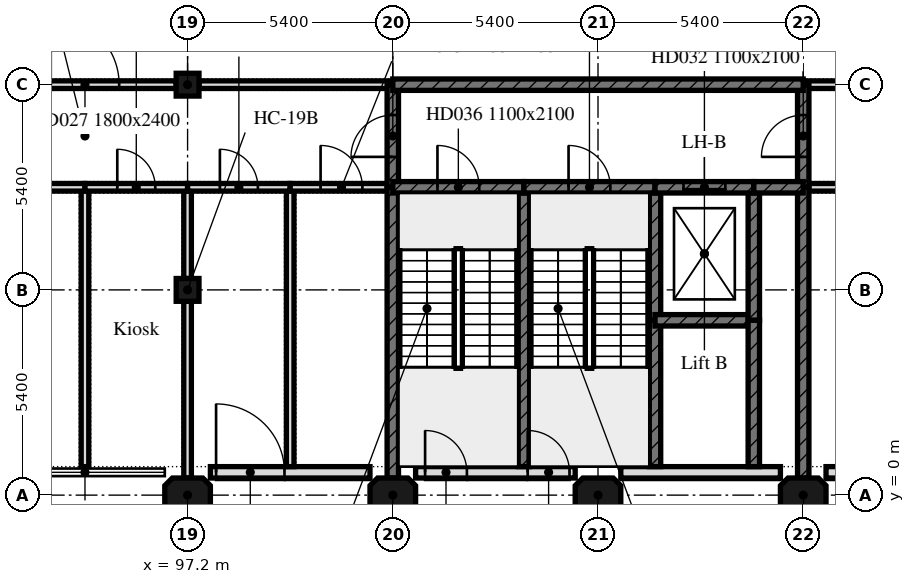
"""IFC4 building model, lengths in metres.
Left out: names, types, materials, properties, quantities, classifications, styles, units other than length and angle.
Written with IfcOpenShell. Run it as: python <this file> out.ifc"""

import sys

from ifc_helpers import new_model, si_unit, direction, frame, frame_2d, origin, origin_2d, place, context, subcontext, project, spatial, polyline, rectangle, outline, extrude, element, fill, save


model = new_model("IFC4")
c1 = context("Model", 3, precision=1e-05, world=origin(), true_north=direction((0.0, 1.0)))
c2 = subcontext(c1, "Body", "Model", "MODEL_VIEW")
j1 = project(units=[si_unit("LENGTHUNIT", "METRE"), si_unit("PLANEANGLEUNIT", "RADIAN")], contexts=[c1])
p1 = place(None, origin())
s1 = spatial("IfcSite", under=j1, at=p1, CompositionType="ELEMENT")
p2 = place(p1, origin())
s2 = spatial("IfcBuilding", under=s1, at=p2, CompositionType="ELEMENT")
p3 = place(p2, origin())
s3 = spatial("IfcBuildingStorey", under=s2, at=p3, CompositionType="ELEMENT", Elevation=0.0)
p4 = place(p3, frame((97.2, 0.0, -0.4), z_axis=(0.0, 0.0, 1.0), x_axis=(1.0, 0.0, 0.0)))
e1 = element("IfcColumn", 1, at=p4, inside=s3, PredefinedType="COLUMN", context=c2, shape_type="SweptSolid", body=[
    extrude(outline(polyline([(-0.4, -0.45), (0.4, -0.45), (0.6, -0.25), (0.6, 0.25), (0.4, 0.45), (-0.4, 0.45), (-0.6, 0.25), (-0.6, -0.25), (-0.4, -0.45)])), origin(), (0.0, 0.0, 1.0), 8.5),
])
for number, where, z_axis, x_axis in (
    (2, (97.2, 5.4, -0.4), (0.0, 0.0, 1.0), (1.0, 0.0, 0.0)),
    (3, (97.2, 10.8, -0.4), (0.0, 0.0, 1.0), (1.0, 0.0, 0.0)),
):
    element("IfcColumn", number, at=place(p3, frame(where, z_axis=z_axis, x_axis=x_axis)), inside=s3, PredefinedType="COLUMN", context=c2, shape_type="SweptSolid", body=[
        extrude(rectangle(XDim=0.6, YDim=0.6, at=origin_2d()), origin(), (0.0, 0.0, 1.0), 8.5),
    ])
for number, where, z_axis, x_axis in (
    (4, (102.6, 0.0, -0.4), (0.0, 0.0, 1.0), (1.0, 0.0, 0.0)),
    (5, (108.0, 0.0, -0.4), (0.0, 0.0, 1.0), (1.0, 0.0, 0.0)),
    (6, (113.4, 0.0, -0.4), (0.0, 0.0, 1.0), (1.0, 0.0, 0.0)),
):
    element("IfcColumn", number, at=place(p3, frame(where, z_axis=z_axis, x_axis=x_axis)), inside=s3, PredefinedType="COLUMN", context=c2, shape_type="SweptSolid", body=[
        extrude(outline(polyline([(-0.4, -0.45), (0.4, -0.45), (0.6, -0.25), (0.6, 0.25), (0.4, 0.45), (-0.4, 0.45), (-0.6, 0.25), (-0.6, -0.25), (-0.4, -0.45)])), origin(), (0.0, 0.0, 1.0), 8.5),
    ])
p5 = place(p3, frame((97.8, 0.6, 0.0), z_axis=(0.0, 0.0, 1.0), x_axis=(1.0, 0.0, 0.0)))
e7 = element("IfcWall", 7, at=p5, inside=s3, PredefinedType="SOLIDWALL", context=c2, shape_type="SweptSolid", body=[
    extrude(rectangle(XDim=4.2, YDim=0.3, at=frame_2d((2.1, 0.0))), origin(), (0.0, 0.0, 1.0), 8.1),
])
p6 = place(p5, frame((0.15, 0.0, 0.0)))
e8 = element("IfcOpeningElement", 8, at=p6, cuts=e7, PredefinedType="OPENING", context=c2, shape_type="SweptSolid", body=[
    extrude(rectangle(XDim=1.8, YDim=2.4, at=frame_2d((0.9, 1.2))), frame((0.0, 0.15, 0.0), z_axis=(0.0, -1.0, 0.0), x_axis=(1.0, 0.0, 0.0)), (0.0, 0.0, 1.0), 0.3),
])
p7 = place(p3, frame((103.2, 0.6, 0.0), z_axis=(0.0, 0.0, 1.0), x_axis=(1.0, 0.0, 0.0)))
e9 = element("IfcWall", 9, at=p7, inside=s3, PredefinedType="SOLIDWALL", context=c2, shape_type="SweptSolid", body=[
    extrude(rectangle(XDim=4.2, YDim=0.3, at=frame_2d((2.1, 0.0))), origin(), (0.0, 0.0, 1.0), 8.1),
])
p8 = place(p7, frame((0.25, 0.0, 0.0)))
e10 = element("IfcOpeningElement", 10, at=p8, cuts=e9, PredefinedType="OPENING", context=c2, shape_type="SweptSolid", body=[
    extrude(rectangle(XDim=1.1, YDim=2.1, at=frame_2d((0.55, 1.05))), frame((0.0, 0.15, 0.0), z_axis=(0.0, -1.0, 0.0), x_axis=(1.0, 0.0, 0.0)), (0.0, 0.0, 1.0), 0.3),
])
p9 = place(p7, frame((2.95, 0.0, 0.0)))
e11 = element("IfcOpeningElement", 11, at=p9, cuts=e9, PredefinedType="OPENING", context=c2, shape_type="SweptSolid", body=[
    extrude(rectangle(XDim=1.1, YDim=2.1, at=frame_2d((0.55, 1.05))), frame((0.0, 0.15, 0.0), z_axis=(0.0, -1.0, 0.0), x_axis=(1.0, 0.0, 0.0)), (0.0, 0.0, 1.0), 0.3),
])
p10 = place(p3, frame((108.6, 0.6, 0.0), z_axis=(0.0, 0.0, 1.0), x_axis=(1.0, 0.0, 0.0)))
e12 = element("IfcWall", 12, at=p10, inside=s3, PredefinedType="SOLIDWALL", context=c2, shape_type="SweptSolid", body=[
    extrude(rectangle(XDim=4.2, YDim=0.3, at=frame_2d((2.1, 0.0))), origin(), (0.0, 0.0, 1.0), 8.1),
])
p11 = place(p3, frame((114.0, 0.6, 0.0), z_axis=(0.0, 0.0, 1.0), x_axis=(1.0, 0.0, 0.0)))
e13 = element("IfcWall", 13, at=p11, inside=s3, PredefinedType="SOLIDWALL", context=c2, shape_type="SweptSolid", body=[
    extrude(rectangle(XDim=4.2, YDim=0.3, at=frame_2d((2.1, 0.0))), origin(), (0.0, 0.0, 1.0), 8.1),
])
p12 = place(p11, frame((2.55, 0.0, 0.9)))
e14 = element("IfcOpeningElement", 14, at=p12, cuts=e13, PredefinedType="OPENING", context=c2, shape_type="SweptSolid", body=[
    extrude(rectangle(XDim=1.1, YDim=1.7, at=frame_2d((0.55, 0.85))), frame((0.0, 0.15, 0.0), z_axis=(0.0, -1.0, 0.0), x_axis=(1.0, 0.0, 0.0)), (0.0, 0.0, 1.0), 0.3),
])
p13 = place(p3, frame((94.5, 0.75, 0.0), z_axis=(0.0, 0.0, 1.0), x_axis=(0.0, 1.0, 0.0)))
e15 = element("IfcWall", 15, at=p13, inside=s3, PredefinedType="PARTITIONING", context=c2, shape_type="SweptSolid", body=[
    extrude(rectangle(XDim=7.35, YDim=0.2, at=frame_2d((3.675, 0.0))), origin(), (0.0, 0.0, 1.0), 8.1),
])
p14 = place(p3, frame((86.4, 8.1, 0.0), z_axis=(0.0, 0.0, 1.0), x_axis=(1.0, 0.0, 0.0)))
e16 = element("IfcWall", 16, at=p14, inside=s3, PredefinedType="PARTITIONING", context=c2, shape_type="SweptSolid", body=[
    extrude(rectangle(XDim=8.1, YDim=0.2, at=frame_2d((4.05, 0.0))), origin(), (0.0, 0.0, 1.0), 8.1),
])
p15 = place(p14, frame((3.55, 0.0, 0.0)))
e17 = element("IfcOpeningElement", 17, at=p15, cuts=e16, PredefinedType="OPENING", context=c2, shape_type="SweptSolid", body=[
    extrude(rectangle(XDim=1.0, YDim=2.1, at=frame_2d((0.5, 1.05))), frame((0.0, 0.1, 0.0), z_axis=(0.0, -1.0, 0.0), x_axis=(1.0, 0.0, 0.0)), (0.0, 0.0, 1.0), 0.2),
])
p16 = place(p3, frame((97.2, 0.45, 0.0), z_axis=(0.0, 0.0, 1.0), x_axis=(0.0, 1.0, 0.0)))
e18 = element("IfcWall", 18, at=p16, inside=s3, PredefinedType="PARTITIONING", context=c2, shape_type="SweptSolid", body=[
    extrude(rectangle(XDim=4.65, YDim=0.2, at=frame_2d((2.325, 0.0))), origin(), (0.0, 0.0, 1.0), 8.1),
])
p17 = place(p3, frame((97.2, 5.7, 0.0), z_axis=(0.0, 0.0, 1.0), x_axis=(0.0, 1.0, 0.0)))
e19 = element("IfcWall", 19, at=p17, inside=s3, PredefinedType="PARTITIONING", context=c2, shape_type="SweptSolid", body=[
    extrude(rectangle(XDim=2.4, YDim=0.2, at=frame_2d((1.2, 0.0))), origin(), (0.0, 0.0, 1.0), 8.1),
])
p18 = place(p3, frame((94.5, 8.1, 0.0), z_axis=(0.0, 0.0, 1.0), x_axis=(1.0, 0.0, 0.0)))
e20 = element("IfcWall", 20, at=p18, inside=s3, PredefinedType="PARTITIONING", context=c2, shape_type="SweptSolid", body=[
    extrude(rectangle(XDim=2.7, YDim=0.2, at=frame_2d((1.35, 0.0))), origin(), (0.0, 0.0, 1.0), 8.1),
])
p19 = place(p18, frame((0.85, 0.0, 0.0)))
e21 = element("IfcOpeningElement", 21, at=p19, cuts=e20, PredefinedType="OPENING", context=c2, shape_type="SweptSolid", body=[
    extrude(rectangle(XDim=1.0, YDim=2.1, at=frame_2d((0.5, 1.05))), frame((0.0, 0.1, 0.0), z_axis=(0.0, -1.0, 0.0), x_axis=(1.0, 0.0, 0.0)), (0.0, 0.0, 1.0), 0.2),
])
p20 = place(p3, frame((99.9, 0.75, 0.0), z_axis=(0.0, 0.0, 1.0), x_axis=(0.0, 1.0, 0.0)))
e22 = element("IfcWall", 22, at=p20, inside=s3, PredefinedType="PARTITIONING", context=c2, shape_type="SweptSolid", body=[
    extrude(rectangle(XDim=7.35, YDim=0.2, at=frame_2d((3.675, 0.0))), origin(), (0.0, 0.0, 1.0), 8.1),
])
p21 = place(p3, frame((97.2, 8.1, 0.0), z_axis=(0.0, 0.0, 1.0), x_axis=(1.0, 0.0, 0.0)))
e23 = element("IfcWall", 23, at=p21, inside=s3, PredefinedType="PARTITIONING", context=c2, shape_type="SweptSolid", body=[
    extrude(rectangle(XDim=2.7, YDim=0.2, at=frame_2d((1.35, 0.0))), origin(), (0.0, 0.0, 1.0), 8.1),
])
p22 = place(p21, frame((0.85, 0.0, 0.0)))
e24 = element("IfcOpeningElement", 24, at=p22, cuts=e23, PredefinedType="OPENING", context=c2, shape_type="SweptSolid", body=[
    extrude(rectangle(XDim=1.0, YDim=2.1, at=frame_2d((0.5, 1.05))), frame((0.0, 0.1, 0.0), z_axis=(0.0, -1.0, 0.0), x_axis=(1.0, 0.0, 0.0)), (0.0, 0.0, 1.0), 0.2),
])
p23 = place(p3, frame((99.9, 8.1, 0.0), z_axis=(0.0, 0.0, 1.0), x_axis=(1.0, 0.0, 0.0)))
e25 = element("IfcWall", 25, at=p23, inside=s3, PredefinedType="PARTITIONING", context=c2, shape_type="SweptSolid", body=[
    extrude(rectangle(XDim=2.7, YDim=0.2, at=frame_2d((1.35, 0.0))), origin(), (0.0, 0.0, 1.0), 8.1),
])
p24 = place(p23, frame((0.8, 0.0, 0.0)))
e26 = element("IfcOpeningElement", 26, at=p24, cuts=e25, PredefinedType="OPENING", context=c2, shape_type="SweptSolid", body=[
    extrude(rectangle(XDim=1.1, YDim=2.1, at=frame_2d((0.55, 1.05))), frame((0.0, 0.1, 0.0), z_axis=(0.0, -1.0, 0.0), x_axis=(1.0, 0.0, 0.0)), (0.0, 0.0, 1.0), 0.2),
])
p25 = place(p3, frame((102.6, 0.45, 0.0), z_axis=(0.0, 0.0, 1.0), x_axis=(0.0, 1.0, 0.0)))
e27 = element("IfcWall", 27, at=p25, inside=s3, PredefinedType="SHEAR", context=c2, shape_type="SweptSolid", body=[
    extrude(rectangle(XDim=7.65, YDim=0.3, at=frame_2d((3.825, 0.0))), origin(), (0.0, 0.0, 1.0), 8.1),
])
p26 = place(p3, frame((92.1, 10.8, 0.0), z_axis=(0.0, 0.0, 1.0), x_axis=(1.0, 0.0, 0.0)))
e28 = element("IfcWall", 28, at=p26, inside=s3, PredefinedType="PARTITIONING", context=c2, shape_type="SweptSolid", body=[
    extrude(rectangle(XDim=4.8, YDim=0.2, at=frame_2d((2.4, 0.0))), origin(), (0.0, 0.0, 1.0), 8.1),
])
p27 = place(p26, frame((1.5, 0.0, 0.0)))
e29 = element("IfcOpeningElement", 29, at=p27, cuts=e28, PredefinedType="OPENING", context=c2, shape_type="SweptSolid", body=[
    extrude(rectangle(XDim=1.8, YDim=2.4, at=frame_2d((0.9, 1.2))), frame((0.0, 0.1, 0.0), z_axis=(0.0, -1.0, 0.0), x_axis=(1.0, 0.0, 0.0)), (0.0, 0.0, 1.0), 0.2),
])
p28 = place(p3, frame((97.5, 10.8, 0.0), z_axis=(0.0, 0.0, 1.0), x_axis=(1.0, 0.0, 0.0)))
e30 = element("IfcWall", 30, at=p28, inside=s3, PredefinedType="PARTITIONING", context=c2, shape_type="SweptSolid", body=[
    extrude(rectangle(XDim=5.1, YDim=0.2, at=frame_2d((2.55, 0.0))), origin(), (0.0, 0.0, 1.0), 8.1),
])
p29 = place(p3, frame((102.6, 8.1, 0.0), z_axis=(0.0, 0.0, 1.0), x_axis=(0.0, 1.0, 0.0)))
e31 = element("IfcWall", 31, at=p29, inside=s3, PredefinedType="SHEAR", context=c2, shape_type="SweptSolid", body=[
    extrude(rectangle(XDim=2.7, YDim=0.3, at=frame_2d((1.35, 0.0))), origin(), (0.0, 0.0, 1.0), 8.1),
])
p30 = place(p29, frame((0.8, 0.0, 0.0)))
e32 = element("IfcOpeningElement", 32, at=p30, cuts=e31, PredefinedType="OPENING", context=c2, shape_type="SweptSolid", body=[
    extrude(rectangle(XDim=1.1, YDim=2.1, at=frame_2d((0.55, 1.05))), frame((0.0, 0.15, 0.0), z_axis=(0.0, -1.0, 0.0), x_axis=(1.0, 0.0, 0.0)), (0.0, 0.0, 1.0), 0.3),
])
p31 = place(p3, frame((113.4, 8.1, 0.0), z_axis=(0.0, 0.0, 1.0), x_axis=(1.0, 0.0, 0.0)))
e33 = element("IfcWall", 33, at=p31, inside=s3, PredefinedType="PARTITIONING", context=c2, shape_type="SweptSolid", body=[
    extrude(rectangle(XDim=2.7, YDim=0.2, at=frame_2d((1.35, 0.0))), origin(), (0.0, 0.0, 1.0), 8.1),
])
p32 = place(p31, frame((0.9, 0.0, 0.0)))
e34 = element("IfcOpeningElement", 34, at=p32, cuts=e33, PredefinedType="OPENING", context=c2, shape_type="SweptSolid", body=[
    extrude(rectangle(XDim=0.9, YDim=2.1, at=frame_2d((0.45, 1.05))), frame((0.0, 0.1, 0.0), z_axis=(0.0, -1.0, 0.0), x_axis=(1.0, 0.0, 0.0)), (0.0, 0.0, 1.0), 0.2),
])
p33 = place(p3, frame((113.4, 0.45, 0.0), z_axis=(0.0, 0.0, 1.0), x_axis=(0.0, 1.0, 0.0)))
e35 = element("IfcWall", 35, at=p33, inside=s3, PredefinedType="SHEAR", context=c2, shape_type="SweptSolid", body=[
    extrude(rectangle(XDim=7.65, YDim=0.3, at=frame_2d((3.825, 0.0))), origin(), (0.0, 0.0, 1.0), 8.1),
])
p34 = place(p3, frame((113.4, 10.8, 0.0), z_axis=(0.0, 0.0, 1.0), x_axis=(1.0, 0.0, 0.0)))
e36 = element("IfcWall", 36, at=p34, inside=s3, PredefinedType="PARTITIONING", context=c2, shape_type="SweptSolid", body=[
    extrude(rectangle(XDim=5.1, YDim=0.2, at=frame_2d((2.55, 0.0))), origin(), (0.0, 0.0, 1.0), 8.1),
])
p35 = place(p34, frame((1.65, 0.0, 0.0)))
e37 = element("IfcOpeningElement", 37, at=p35, cuts=e36, PredefinedType="OPENING", context=c2, shape_type="SweptSolid", body=[
    extrude(rectangle(XDim=1.8, YDim=2.4, at=frame_2d((0.9, 1.2))), frame((0.0, 0.1, 0.0), z_axis=(0.0, -1.0, 0.0), x_axis=(1.0, 0.0, 0.0)), (0.0, 0.0, 1.0), 0.2),
])
p36 = place(p3, frame((113.4, 8.1, 0.0), z_axis=(0.0, 0.0, 1.0), x_axis=(0.0, 1.0, 0.0)))
e38 = element("IfcWall", 38, at=p36, inside=s3, PredefinedType="SHEAR", context=c2, shape_type="SweptSolid", body=[
    extrude(rectangle(XDim=2.7, YDim=0.3, at=frame_2d((1.35, 0.0))), origin(), (0.0, 0.0, 1.0), 8.1),
])
p37 = place(p36, frame((0.8, 0.0, 0.0)))
e39 = element("IfcOpeningElement", 39, at=p37, cuts=e38, PredefinedType="OPENING", context=c2, shape_type="SweptSolid", body=[
    extrude(rectangle(XDim=1.1, YDim=2.1, at=frame_2d((0.55, 1.05))), frame((0.0, 0.15, 0.0), z_axis=(0.0, -1.0, 0.0), x_axis=(1.0, 0.0, 0.0)), (0.0, 0.0, 1.0), 0.3),
])
p38 = place(p3, frame((102.6, 10.8, 0.0), z_axis=(0.0, 0.0, 1.0), x_axis=(1.0, 0.0, 0.0)))
e40 = element("IfcWall", 40, at=p38, inside=s3, PredefinedType="SHEAR", context=c2, shape_type="SweptSolid", body=[
    extrude(rectangle(XDim=10.8, YDim=0.3, at=frame_2d((5.4, 0.0))), origin(), (0.0, 0.0, 1.0), 8.1),
])
p39 = place(p3, frame((106.05, 0.75, 0.0), z_axis=(0.0, 0.0, 1.0), x_axis=(0.0, 1.0, 0.0)))
e41 = element("IfcWall", 41, at=p39, inside=s3, PredefinedType="SHEAR", context=c2, shape_type="SweptSolid", body=[
    extrude(rectangle(XDim=7.35, YDim=0.3, at=frame_2d((3.675, 0.0))), origin(), (0.0, 0.0, 1.0), 8.1),
])
p40 = place(p3, frame((102.6, 8.1, 0.0), z_axis=(0.0, 0.0, 1.0), x_axis=(1.0, 0.0, 0.0)))
e42 = element("IfcWall", 42, at=p40, inside=s3, PredefinedType="SHEAR", context=c2, shape_type="SweptSolid", body=[
    extrude(rectangle(XDim=3.45, YDim=0.3, at=frame_2d((1.725, 0.0))), origin(), (0.0, 0.0, 1.0), 8.1),
])
p41 = place(p40, frame((1.175, 0.0, 0.0)))
e43 = element("IfcOpeningElement", 43, at=p41, cuts=e42, PredefinedType="OPENING", context=c2, shape_type="SweptSolid", body=[
    extrude(rectangle(XDim=1.1, YDim=2.1, at=frame_2d((0.55, 1.05))), frame((0.0, 0.15, 0.0), z_axis=(0.0, -1.0, 0.0), x_axis=(1.0, 0.0, 0.0)), (0.0, 0.0, 1.0), 0.3),
])
p42 = place(p3, frame((109.5, 4.6, 0.0), z_axis=(0.0, 0.0, 1.0), x_axis=(0.0, 1.0, 0.0)))
e44 = element("IfcWall", 44, at=p42, inside=s3, PredefinedType="SHEAR", context=c2, shape_type="SweptSolid", body=[
    extrude(rectangle(XDim=3.5, YDim=0.3, at=frame_2d((1.75, 0.0))), origin(), (0.0, 0.0, 1.0), 8.1),
])
p43 = place(p3, frame((109.5, 0.75, 0.0), z_axis=(0.0, 0.0, 1.0), x_axis=(0.0, 1.0, 0.0)))
e45 = element("IfcWall", 45, at=p43, inside=s3, PredefinedType="SHEAR", context=c2, shape_type="SweptSolid", body=[
    extrude(rectangle(XDim=3.85, YDim=0.3, at=frame_2d((1.925, 0.0))), origin(), (0.0, 0.0, 1.0), 8.1),
])
p44 = place(p3, frame((106.05, 8.1, 0.0), z_axis=(0.0, 0.0, 1.0), x_axis=(1.0, 0.0, 0.0)))
e46 = element("IfcWall", 46, at=p44, inside=s3, PredefinedType="SHEAR", context=c2, shape_type="SweptSolid", body=[
    extrude(rectangle(XDim=3.45, YDim=0.3, at=frame_2d((1.725, 0.0))), origin(), (0.0, 0.0, 1.0), 8.1),
])
p45 = place(p44, frame((1.175, 0.0, 0.0)))
e47 = element("IfcOpeningElement", 47, at=p45, cuts=e46, PredefinedType="OPENING", context=c2, shape_type="SweptSolid", body=[
    extrude(rectangle(XDim=1.1, YDim=2.1, at=frame_2d((0.55, 1.05))), frame((0.0, 0.15, 0.0), z_axis=(0.0, -1.0, 0.0), x_axis=(1.0, 0.0, 0.0)), (0.0, 0.0, 1.0), 0.3),
])
p46 = place(p3, frame((109.5, 4.6, 0.0), z_axis=(0.0, 0.0, 1.0), x_axis=(1.0, 0.0, 0.0)))
e48 = element("IfcWall", 48, at=p46, inside=s3, PredefinedType="SHEAR", context=c2, shape_type="SweptSolid", body=[
    extrude(rectangle(XDim=2.6, YDim=0.3, at=frame_2d((1.3, 0.0))), origin(), (0.0, 0.0, 1.0), 8.1),
])
p47 = place(p3, frame((112.1, 4.6, 0.0), z_axis=(0.0, 0.0, 1.0), x_axis=(0.0, 1.0, 0.0)))
e49 = element("IfcWall", 49, at=p47, inside=s3, PredefinedType="SHEAR", context=c2, shape_type="SweptSolid", body=[
    extrude(rectangle(XDim=3.5, YDim=0.3, at=frame_2d((1.75, 0.0))), origin(), (0.0, 0.0, 1.0), 8.1),
])
p48 = place(p3, frame((109.5, 8.1, 0.0), z_axis=(0.0, 0.0, 1.0), x_axis=(1.0, 0.0, 0.0)))
e50 = element("IfcWall", 50, at=p48, inside=s3, PredefinedType="SHEAR", context=c2, shape_type="SweptSolid", body=[
    extrude(rectangle(XDim=2.6, YDim=0.3, at=frame_2d((1.3, 0.0))), origin(), (0.0, 0.0, 1.0), 8.1),
])
p49 = place(p48, frame((0.75, 0.0, 0.0)))
e51 = element("IfcOpeningElement", 51, at=p49, cuts=e50, PredefinedType="OPENING", context=c2, shape_type="SweptSolid", body=[
    extrude(rectangle(XDim=1.1, YDim=2.1, at=frame_2d((0.55, 1.05))), frame((0.0, 0.15, 0.0), z_axis=(0.0, -1.0, 0.0), x_axis=(1.0, 0.0, 0.0)), (0.0, 0.0, 1.0), 0.3),
])
p50 = place(p3, frame((112.1, 0.75, 0.0), z_axis=(0.0, 0.0, 1.0), x_axis=(0.0, 1.0, 0.0)))
e52 = element("IfcWall", 52, at=p50, inside=s3, PredefinedType="SHEAR", context=c2, shape_type="SweptSolid", body=[
    extrude(rectangle(XDim=3.85, YDim=0.3, at=frame_2d((1.925, 0.0))), origin(), (0.0, 0.0, 1.0), 8.1),
])
p51 = place(p3, frame((112.1, 8.1, 0.0), z_axis=(0.0, 0.0, 1.0), x_axis=(1.0, 0.0, 0.0)))
e53 = element("IfcWall", 53, at=p51, inside=s3, PredefinedType="SHEAR", context=c2, shape_type="SweptSolid", body=[
    extrude(rectangle(XDim=1.3, YDim=0.3, at=frame_2d((0.65, 0.0))), origin(), (0.0, 0.0, 1.0), 8.1),
])
p52 = place(p6, origin())
e54 = element("IfcDoor", 54, at=p52, inside=s3, OperationType="DOUBLE_DOOR_SINGLE_SWING", PredefinedType="DOOR", context=c2, shape_type="SweptSolid", body=[
    extrude(rectangle(XDim=1.8, YDim=2.4, at=frame_2d((0.9, 1.2))), frame((0.0, 0.025, 0.0), z_axis=(0.0, -1.0, 0.0), x_axis=(1.0, 0.0, 0.0)), (0.0, 0.0, 1.0), 0.05),
])
fill(e8, e54)
p53 = place(p8, origin())
e55 = element("IfcDoor", 55, at=p53, inside=s3, OperationType="SINGLE_SWING_LEFT", PredefinedType="DOOR", context=c2, shape_type="SweptSolid", body=[
    extrude(rectangle(XDim=1.1, YDim=2.1, at=frame_2d((0.55, 1.05))), frame((0.0, 0.025, 0.0), z_axis=(0.0, -1.0, 0.0), x_axis=(1.0, 0.0, 0.0)), (0.0, 0.0, 1.0), 0.05),
])
fill(e10, e55)
p54 = place(p9, origin())
e56 = element("IfcDoor", 56, at=p54, inside=s3, OperationType="SINGLE_SWING_LEFT", PredefinedType="DOOR", context=c2, shape_type="SweptSolid", body=[
    extrude(rectangle(XDim=1.1, YDim=2.1, at=frame_2d((0.55, 1.05))), frame((0.0, 0.025, 0.0), z_axis=(0.0, -1.0, 0.0), x_axis=(1.0, 0.0, 0.0)), (0.0, 0.0, 1.0), 0.05),
])
fill(e11, e56)
p55 = place(p19, origin())
e57 = element("IfcDoor", 57, at=p55, inside=s3, OperationType="SINGLE_SWING_LEFT", PredefinedType="DOOR", context=c2, shape_type="SweptSolid", body=[
    extrude(rectangle(XDim=1.0, YDim=2.1, at=frame_2d((0.5, 1.05))), frame((0.0, 0.025, 0.0), z_axis=(0.0, -1.0, 0.0), x_axis=(1.0, 0.0, 0.0)), (0.0, 0.0, 1.0), 0.05),
])
fill(e21, e57)
p56 = place(p22, origin())
e58 = element("IfcDoor", 58, at=p56, inside=s3, OperationType="SINGLE_SWING_LEFT", PredefinedType="DOOR", context=c2, shape_type="SweptSolid", body=[
    extrude(rectangle(XDim=1.0, YDim=2.1, at=frame_2d((0.5, 1.05))), frame((0.0, 0.025, 0.0), z_axis=(0.0, -1.0, 0.0), x_axis=(1.0, 0.0, 0.0)), (0.0, 0.0, 1.0), 0.05),
])
fill(e24, e58)
p57 = place(p24, origin())
e59 = element("IfcDoor", 59, at=p57, inside=s3, OperationType="SINGLE_SWING_LEFT", PredefinedType="DOOR", context=c2, shape_type="SweptSolid", body=[
    extrude(rectangle(XDim=1.1, YDim=2.1, at=frame_2d((0.55, 1.05))), frame((0.0, 0.025, 0.0), z_axis=(0.0, -1.0, 0.0), x_axis=(1.0, 0.0, 0.0)), (0.0, 0.0, 1.0), 0.05),
])
fill(e26, e59)
p58 = place(p30, origin())
e60 = element("IfcDoor", 60, at=p58, inside=s3, OperationType="SINGLE_SWING_LEFT", PredefinedType="DOOR", context=c2, shape_type="SweptSolid", body=[
    extrude(rectangle(XDim=1.1, YDim=2.1, at=frame_2d((0.55, 1.05))), frame((0.0, 0.025, 0.0), z_axis=(0.0, -1.0, 0.0), x_axis=(1.0, 0.0, 0.0)), (0.0, 0.0, 1.0), 0.05),
])
fill(e32, e60)
p59 = place(p27, origin())
e61 = element("IfcDoor", 61, at=p59, inside=s3, OperationType="DOUBLE_DOOR_SINGLE_SWING", PredefinedType="DOOR", context=c2, shape_type="SweptSolid", body=[
    extrude(rectangle(XDim=1.8, YDim=2.4, at=frame_2d((0.9, 1.2))), frame((0.0, 0.025, 0.0), z_axis=(0.0, -1.0, 0.0), x_axis=(1.0, 0.0, 0.0)), (0.0, 0.0, 1.0), 0.05),
])
fill(e29, e61)
p60 = place(p37, origin())
e62 = element("IfcDoor", 62, at=p60, inside=s3, OperationType="SINGLE_SWING_LEFT", PredefinedType="DOOR", context=c2, shape_type="SweptSolid", body=[
    extrude(rectangle(XDim=1.1, YDim=2.1, at=frame_2d((0.55, 1.05))), frame((0.0, 0.025, 0.0), z_axis=(0.0, -1.0, 0.0), x_axis=(1.0, 0.0, 0.0)), (0.0, 0.0, 1.0), 0.05),
])
fill(e39, e62)
p61 = place(p41, origin())
e63 = element("IfcDoor", 63, at=p61, inside=s3, OperationType="SINGLE_SWING_LEFT", PredefinedType="DOOR", context=c2, shape_type="SweptSolid", body=[
    extrude(rectangle(XDim=1.1, YDim=2.1, at=frame_2d((0.55, 1.05))), frame((0.0, 0.025, 0.0), z_axis=(0.0, -1.0, 0.0), x_axis=(1.0, 0.0, 0.0)), (0.0, 0.0, 1.0), 0.05),
])
fill(e43, e63)
p62 = place(p45, origin())
e64 = element("IfcDoor", 64, at=p62, inside=s3, OperationType="SINGLE_SWING_LEFT", PredefinedType="DOOR", context=c2, shape_type="SweptSolid", body=[
    extrude(rectangle(XDim=1.1, YDim=2.1, at=frame_2d((0.55, 1.05))), frame((0.0, 0.025, 0.0), z_axis=(0.0, -1.0, 0.0), x_axis=(1.0, 0.0, 0.0)), (0.0, 0.0, 1.0), 0.05),
])
fill(e47, e64)
p63 = place(p49, origin())
e65 = element("IfcDoor", 65, at=p63, inside=s3, OperationType="SLIDING_TO_LEFT", PredefinedType="DOOR", context=c2, shape_type="SweptSolid", body=[
    extrude(rectangle(XDim=1.1, YDim=2.1, at=frame_2d((0.55, 1.05))), frame((0.0, 0.025, 0.0), z_axis=(0.0, -1.0, 0.0), x_axis=(1.0, 0.0, 0.0)), (0.0, 0.0, 1.0), 0.05),
])
fill(e51, e65)
save(model, sys.argv[1])
